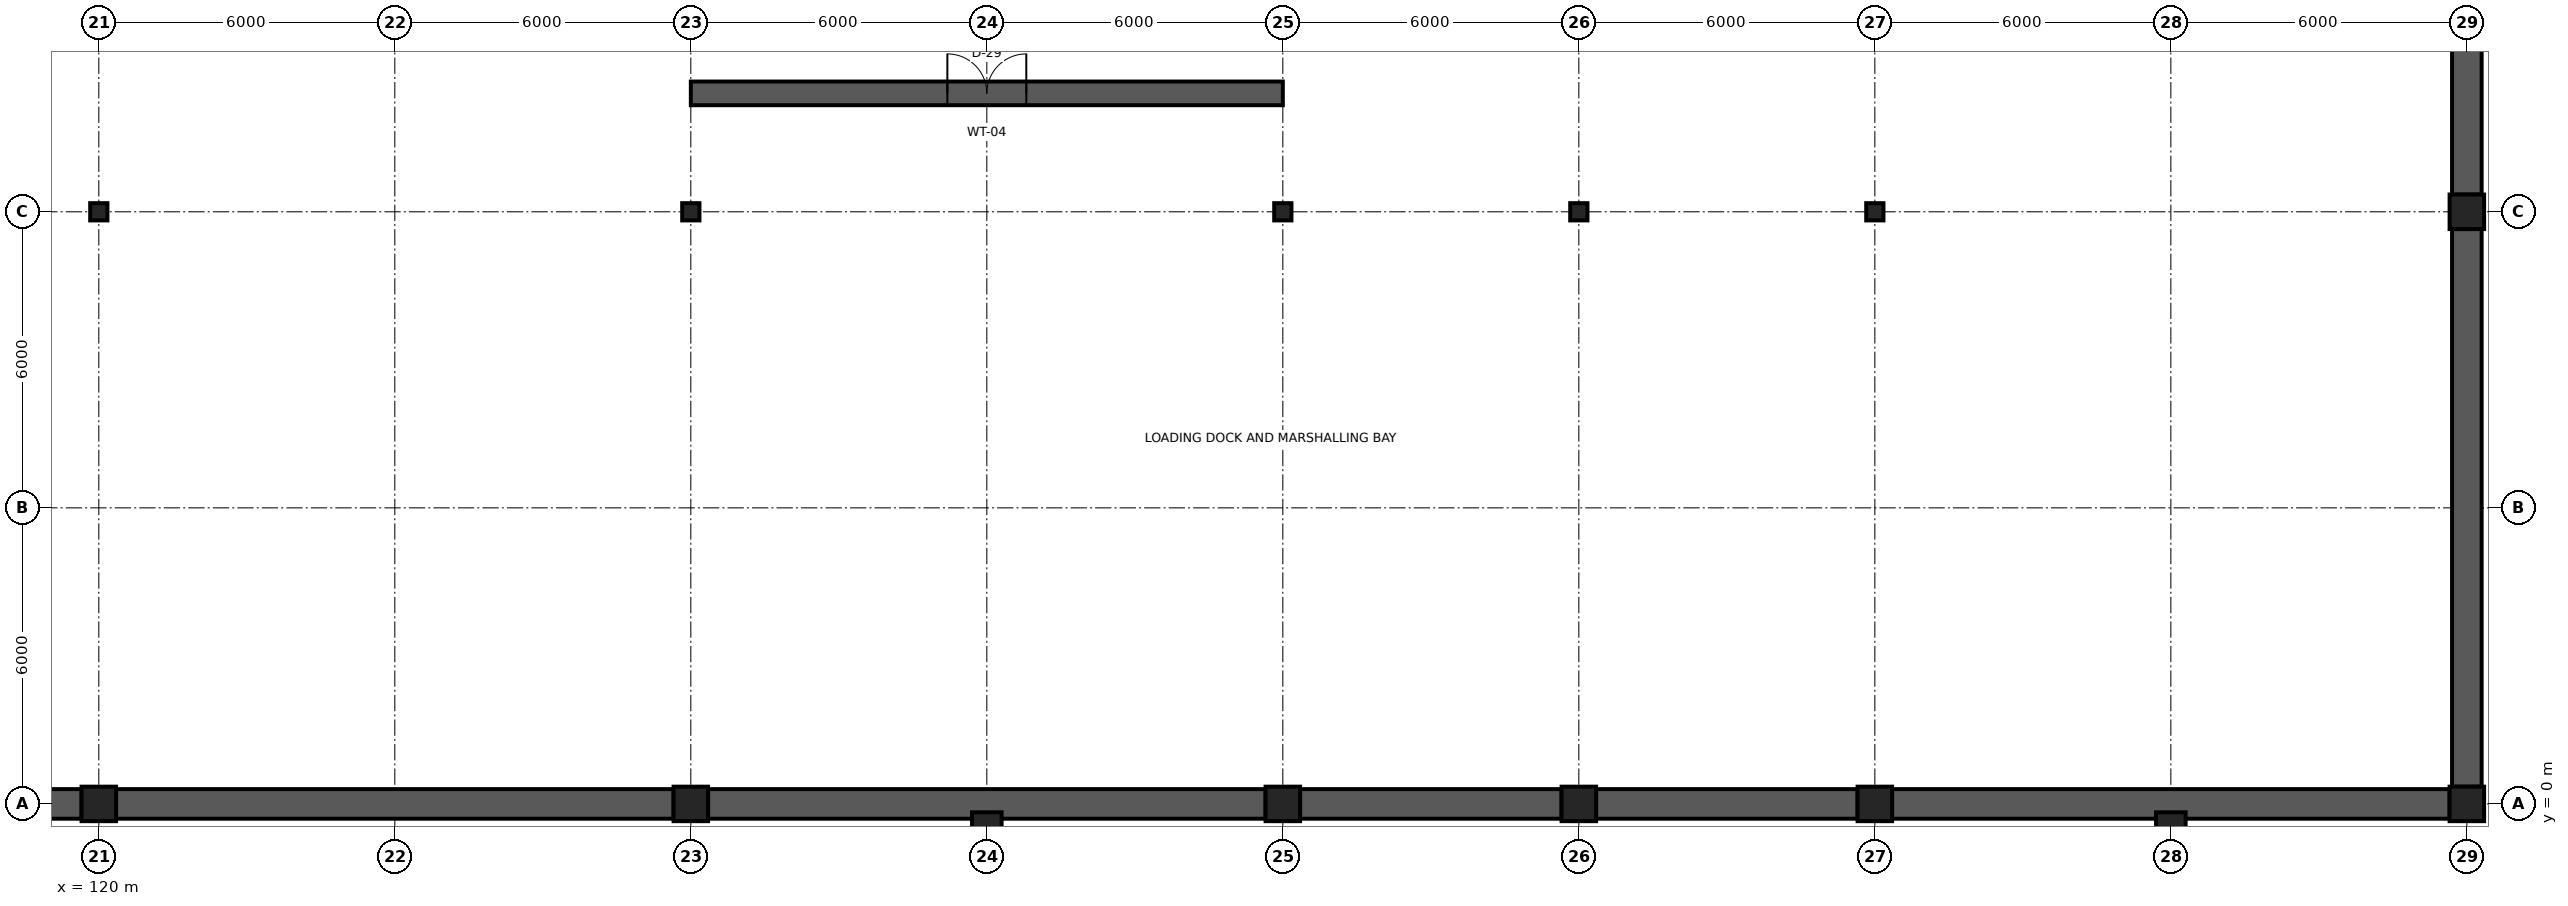
"""IFC4 building model, lengths in metres.
Left out: names, types, materials, properties, quantities, classifications, styles, units other than length and angle.
Written with IfcOpenShell. Run it as: python <this file> out.ifc"""

import sys

from ifc_helpers import new_model, si_unit, direction, frame, frame_2d, origin, origin_2d, place, context, subcontext, project, spatial, rectangle, i_section, extrude, element, fill, save


model = new_model("IFC4")
c1 = context("Model", 3, precision=1e-05, world=origin(), true_north=direction((0.0, 1.0)))
c2 = subcontext(c1, "Body", "Model", "MODEL_VIEW")
j1 = project(units=[si_unit("LENGTHUNIT", "METRE"), si_unit("PLANEANGLEUNIT", "RADIAN")], contexts=[c1])
p1 = place(None, origin())
s1 = spatial("IfcSite", under=j1, at=p1, CompositionType="ELEMENT")
p2 = place(p1, origin())
s2 = spatial("IfcBuilding", under=s1, at=p2, CompositionType="ELEMENT")
p3 = place(p2, frame((0.0, 0.0, -4.8)))
s3 = spatial("IfcBuildingStorey", under=s2, at=p3, CompositionType="ELEMENT", Elevation=-4.8)
for number, where, z_axis, x_axis in (
    (1, (120.0, 0.0, 0.0), (0.0, 0.0, 1.0), (1.0, 0.0, 0.0)),
    (2, (132.0, 0.0, 0.0), (0.0, 0.0, 1.0), (1.0, 0.0, 0.0)),
    (3, (144.0, 0.0, 0.0), (0.0, 0.0, 1.0), (1.0, 0.0, 0.0)),
    (4, (150.0, 0.0, 0.0), (0.0, 0.0, 1.0), (1.0, 0.0, 0.0)),
    (5, (156.0, 0.0, 0.0), (0.0, 0.0, 1.0), (1.0, 0.0, 0.0)),
    (6, (168.0, 0.0, 0.0), (0.0, 0.0, 1.0), (1.0, 0.0, 0.0)),
):
    element("IfcColumn", number, at=place(p3, frame(where, z_axis=z_axis, x_axis=x_axis)), inside=s3, PredefinedType="COLUMN", context=c2, shape_type="SweptSolid", body=[
        extrude(rectangle(XDim=0.7, YDim=0.7, at=origin_2d()), origin(), (0.0, 0.0, 1.0), 4.8),
    ])
for number, where, z_axis, x_axis in (
    (7, (120.0, 12.0, 0.0), (0.0, 0.0, 1.0), (1.0, 0.0, 0.0)),
    (8, (132.0, 12.0, 0.0), (0.0, 0.0, 1.0), (1.0, 0.0, 0.0)),
    (9, (144.0, 12.0, 0.0), (0.0, 0.0, 1.0), (1.0, 0.0, 0.0)),
    (10, (150.0, 12.0, 0.0), (0.0, 0.0, 1.0), (1.0, 0.0, 0.0)),
    (11, (156.0, 12.0, 0.0), (0.0, 0.0, 1.0), (1.0, 0.0, 0.0)),
):
    element("IfcColumn", number, at=place(p3, frame(where, z_axis=z_axis, x_axis=x_axis)), inside=s3, PredefinedType="COLUMN", context=c2, shape_type="SweptSolid", body=[
        extrude(i_section(OverallWidth=0.35, OverallDepth=0.35, WebThickness=0.012, FlangeThickness=0.019, FilletRadius=0.02, at=origin_2d()), origin(), (0.0, 0.0, 1.0), 4.8),
    ])
p4 = place(p3, frame((168.0, 12.0, 0.0), z_axis=(0.0, 0.0, 1.0), x_axis=(1.0, 0.0, 0.0)))
e12 = element("IfcColumn", 12, at=p4, inside=s3, PredefinedType="COLUMN", context=c2, shape_type="SweptSolid", body=[
    extrude(rectangle(XDim=0.7, YDim=0.7, at=origin_2d()), origin(), (0.0, 0.0, 1.0), 4.8),
])
for number, where, z_axis, x_axis in (
    (13, (138.0, -0.35, 0.0), (0.0, 0.0, 1.0), (1.0, 0.0, 0.0)),
    (14, (162.0, -0.35, 0.0), (0.0, 0.0, 1.0), (1.0, 0.0, 0.0)),
):
    element("IfcColumn", number, at=place(p3, frame(where, z_axis=z_axis, x_axis=x_axis)), inside=s3, PredefinedType="PILASTER", context=c2, shape_type="SweptSolid", body=[
        extrude(rectangle(XDim=0.6, YDim=0.36, at=origin_2d()), origin(), (0.0, 0.0, 1.0), 4.8),
    ])
p5 = place(p3, frame((114.35, 0.0, 0.0), z_axis=(0.0, 0.0, 1.0), x_axis=(1.0, 0.0, 0.0)))
e15 = element("IfcWall", 15, at=p5, inside=s3, PredefinedType="SHEAR", context=c2, shape_type="SweptSolid", body=[
    extrude(rectangle(XDim=5.3, YDim=0.6, at=frame_2d((2.65, 0.0))), origin(), (0.0, 0.0, 1.0), 4.48),
])
for number, where, z_axis, x_axis in (
    (16, (120.35, 0.0, 0.0), (0.0, 0.0, 1.0), (1.0, 0.0, 0.0)),
    (17, (132.35, 0.0, 0.0), (0.0, 0.0, 1.0), (1.0, 0.0, 0.0)),
):
    element("IfcWall", number, at=place(p3, frame(where, z_axis=z_axis, x_axis=x_axis)), inside=s3, PredefinedType="SHEAR", context=c2, shape_type="SweptSolid", body=[
        extrude(rectangle(XDim=11.3, YDim=0.6, at=frame_2d((5.65, 0.0))), origin(), (0.0, 0.0, 1.0), 4.48),
    ])
for number, where, z_axis, x_axis in (
    (18, (144.35, 0.0, 0.0), (0.0, 0.0, 1.0), (1.0, 0.0, 0.0)),
    (19, (150.35, 0.0, 0.0), (0.0, 0.0, 1.0), (1.0, 0.0, 0.0)),
):
    element("IfcWall", number, at=place(p3, frame(where, z_axis=z_axis, x_axis=x_axis)), inside=s3, PredefinedType="SHEAR", context=c2, shape_type="SweptSolid", body=[
        extrude(rectangle(XDim=5.3, YDim=0.6, at=frame_2d((2.65, 0.0))), origin(), (0.0, 0.0, 1.0), 4.48),
    ])
for number, where, z_axis, x_axis in (
    (20, (156.35, 0.0, 0.0), (0.0, 0.0, 1.0), (1.0, 0.0, 0.0)),
    (21, (168.0, 0.35, 0.0), (0.0, 0.0, 1.0), (0.0, 1.0, 0.0)),
):
    element("IfcWall", number, at=place(p3, frame(where, z_axis=z_axis, x_axis=x_axis)), inside=s3, PredefinedType="SHEAR", context=c2, shape_type="SweptSolid", body=[
        extrude(rectangle(XDim=11.3, YDim=0.6, at=frame_2d((5.65, 0.0))), origin(), (0.0, 0.0, 1.0), 4.48),
    ])
p6 = place(p3, frame((168.0, 12.35, 0.0), z_axis=(0.0, 0.0, 1.0), x_axis=(0.0, 1.0, 0.0)))
e22 = element("IfcWall", 22, at=p6, inside=s3, PredefinedType="SHEAR", context=c2, shape_type="SweptSolid", body=[
    extrude(rectangle(XDim=5.3, YDim=0.6, at=frame_2d((2.65, 0.0))), origin(), (0.0, 0.0, 1.0), 4.48),
])
p7 = place(p3, frame((132.0, 14.4, 0.0), z_axis=(0.0, 0.0, 1.0), x_axis=(1.0, 0.0, 0.0)))
e23 = element("IfcWall", 23, at=p7, inside=s3, PredefinedType="SHEAR", context=c2, shape_type="SweptSolid", body=[
    extrude(rectangle(XDim=12.0, YDim=0.48, at=frame_2d((6.0, 0.0))), origin(), (0.0, 0.0, 1.0), 4.48),
])
p8 = place(p7, frame((5.2, 0.0, 0.0)))
e24 = element("IfcOpeningElement", 24, at=p8, cuts=e23, PredefinedType="OPENING", context=c2, shape_type="SweptSolid", body=[
    extrude(rectangle(XDim=1.6, YDim=2.25, at=frame_2d((0.8, 1.125))), frame((0.0, 0.255, 0.0), z_axis=(0.0, -1.0, 0.0), x_axis=(1.0, 0.0, 0.0)), (0.0, 0.0, 1.0), 0.51),
])
p9 = place(p8, origin())
e25 = element("IfcDoor", 25, at=p9, inside=s3, OperationType="DOUBLE_DOOR_SINGLE_SWING", PredefinedType="DOOR", context=c2, shape_type="SweptSolid", body=[
    extrude(rectangle(XDim=1.6, YDim=2.25, at=frame_2d((0.8, 1.125))), frame((0.0, 0.025, 0.0), z_axis=(0.0, -1.0, 0.0), x_axis=(1.0, 0.0, 0.0)), (0.0, 0.0, 1.0), 0.05),
])
fill(e24, e25)
save(model, sys.argv[1])
